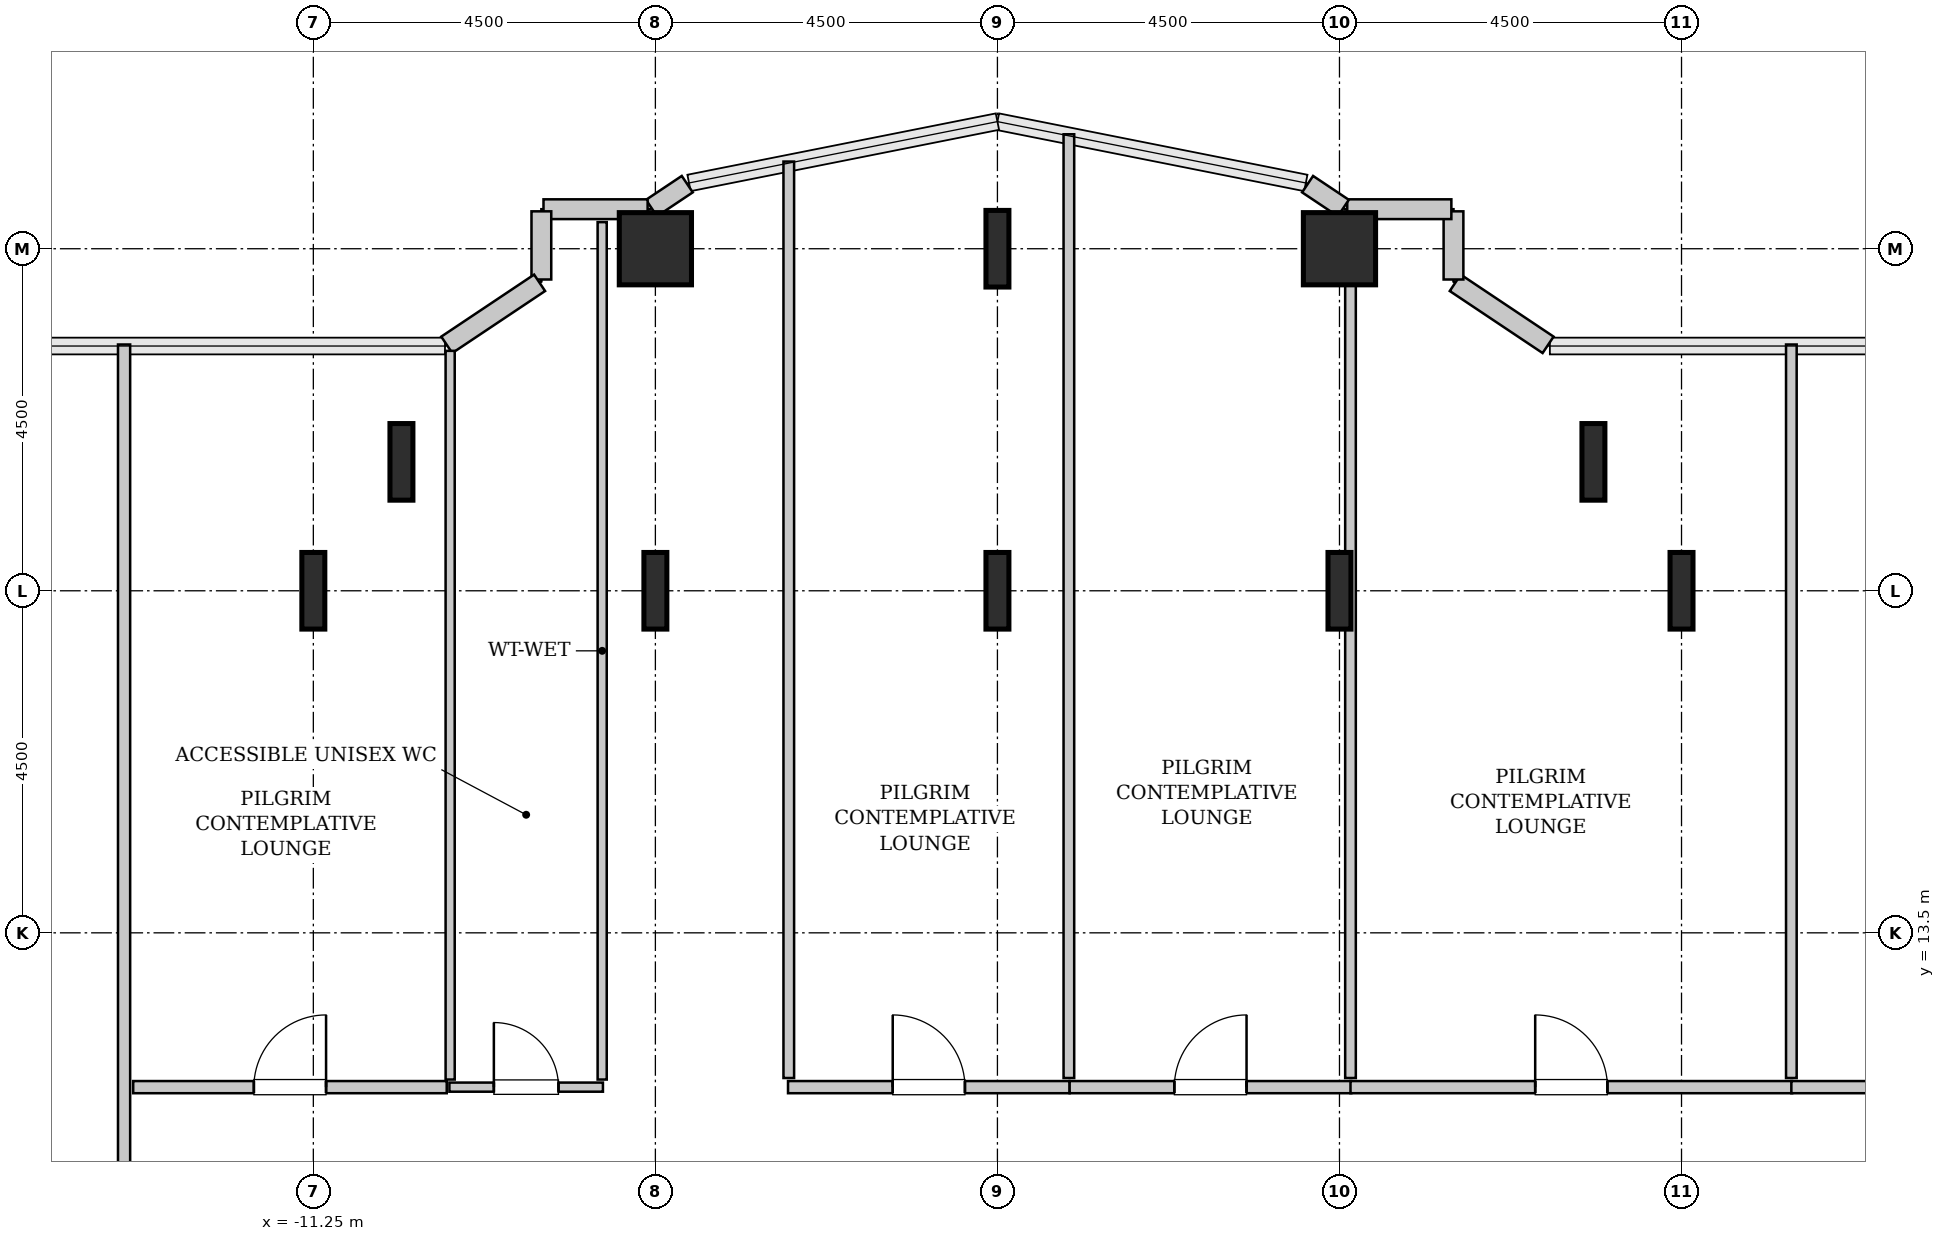
"""IFC4 building model, lengths in metres.
Left out: names, types, materials, properties, quantities, classifications, styles, units other than length and angle.
Written with IfcOpenShell. Run it as: python <this file> out.ifc"""

import sys

from ifc_helpers import new_model, si_unit, direction, frame, frame_2d, origin, origin_2d, place, context, subcontext, project, spatial, rectangle, hollow_rectangle, i_section, extrude, source, transform, mapped, element, fill, save


model = new_model("IFC4")
c1 = context("Model", 3, precision=1e-05, world=origin(), true_north=direction((0.0, 1.0)))
c2 = subcontext(c1, "Body", "Model", "MODEL_VIEW")
j1 = project(units=[si_unit("LENGTHUNIT", "METRE"), si_unit("PLANEANGLEUNIT", "RADIAN")], contexts=[c1])
p1 = place(None, origin())
s1 = spatial("IfcSite", under=j1, at=p1, CompositionType="ELEMENT")
p2 = place(p1, origin())
s2 = spatial("IfcBuilding", under=s1, at=p2, CompositionType="ELEMENT")
p3 = place(p2, frame((0.0, 0.0, 36.8)))
s3 = spatial("IfcBuildingStorey", under=s2, at=p3, CompositionType="ELEMENT", Elevation=36.8)
m1 = source(origin(), c2, "Body", "SweptSolid", [
    extrude(i_section(OverallWidth=0.302, OverallDepth=1.008, WebThickness=0.021, FlangeThickness=0.04, FilletRadius=0.03, at=origin_2d()), origin(), (0.0, 0.0, 1.0), 3.8),
])
for number, where, z_axis, x_axis in (
    (1, (-11.25, 18.0, 0.0), (0.0, 0.0, 1.0), (1.0, 0.0, 0.0)),
    (2, (-10.091, 19.696, 0.0), (0.0, 0.0, 1.0), (1.0, 0.0, 0.0)),
    (3, (-6.75, 18.0, 0.0), (0.0, 0.0, 1.0), (1.0, 0.0, 0.0)),
):
    element("IfcColumn", number, at=place(p3, frame(where, z_axis=z_axis, x_axis=x_axis)), inside=s3, PredefinedType="COLUMN", context=c2, shape_type="MappedRepresentation", body=[
        mapped(m1, transform((0.0, 0.0, 0.0), x_axis=(1.0, 0.0, 0.0), y_axis=(0.0, 1.0, 0.0), z_axis=(0.0, 0.0, 1.0), scale=1.0)),
    ])
m2 = source(origin(), c2, "Body", "SweptSolid", [
    extrude(hollow_rectangle(XDim=0.95, YDim=0.95, WallThickness=0.045, InnerFilletRadius=0.045, OuterFilletRadius=0.09, at=origin_2d()), origin(), (0.0, 0.0, 1.0), 3.8),
])
p4 = place(p3, frame((-6.75, 22.5, 0.0), z_axis=(0.0, 0.0, 1.0), x_axis=(1.0, 0.0, 0.0)))
e4 = element("IfcColumn", 4, at=p4, inside=s3, PredefinedType="COLUMN", context=c2, shape_type="MappedRepresentation", body=[
    mapped(m2, transform((0.0, 0.0, 0.0), x_axis=(1.0, 0.0, 0.0), y_axis=(0.0, 1.0, 0.0), z_axis=(0.0, 0.0, 1.0), scale=1.0)),
])
for number, where, z_axis, x_axis in (
    (5, (-2.25, 18.0, 0.0), (0.0, 0.0, 1.0), (1.0, 0.0, 0.0)),
    (6, (-2.25, 22.5, 0.0), (0.0, 0.0, 1.0), (1.0, 0.0, 0.0)),
    (7, (2.25, 18.0, 0.0), (0.0, 0.0, 1.0), (1.0, 0.0, 0.0)),
):
    element("IfcColumn", number, at=place(p3, frame(where, z_axis=z_axis, x_axis=x_axis)), inside=s3, PredefinedType="COLUMN", context=c2, shape_type="MappedRepresentation", body=[
        mapped(m1, transform((0.0, 0.0, 0.0), x_axis=(1.0, 0.0, 0.0), y_axis=(0.0, 1.0, 0.0), z_axis=(0.0, 0.0, 1.0), scale=1.0)),
    ])
p5 = place(p3, frame((2.25, 22.5, 0.0), z_axis=(0.0, 0.0, 1.0), x_axis=(1.0, 0.0, 0.0)))
e8 = element("IfcColumn", 8, at=p5, inside=s3, PredefinedType="COLUMN", context=c2, shape_type="MappedRepresentation", body=[
    mapped(m2, transform((0.0, 0.0, 0.0), x_axis=(1.0, 0.0, 0.0), y_axis=(0.0, 1.0, 0.0), z_axis=(0.0, 0.0, 1.0), scale=1.0)),
])
for number, where, z_axis, x_axis in (
    (9, (5.591, 19.696, 0.0), (0.0, 0.0, 1.0), (1.0, 0.0, 0.0)),
    (10, (6.75, 18.0, 0.0), (0.0, 0.0, 1.0), (1.0, 0.0, 0.0)),
):
    element("IfcColumn", number, at=place(p3, frame(where, z_axis=z_axis, x_axis=x_axis)), inside=s3, PredefinedType="COLUMN", context=c2, shape_type="MappedRepresentation", body=[
        mapped(m1, transform((0.0, 0.0, 0.0), x_axis=(1.0, 0.0, 0.0), y_axis=(0.0, 1.0, 0.0), z_axis=(0.0, 0.0, 1.0), scale=1.0)),
    ])
m3 = source(origin(), c2, "Body", "SweptSolid", [
    extrude(rectangle(XDim=1.469, YDim=0.26, at=frame_2d((0.734, 0.0))), origin(), (0.0, 0.0, 1.0), 3.55),
])
p6 = place(p3, frame((4.995, 21.236, 0.0), z_axis=(0.0, 0.0, 1.0), x_axis=(-0.831461760506, 0.555581983884, 0.0)))
e11 = element("IfcWall", 11, at=p6, inside=s3, PredefinedType="SOLIDWALL", context=c2, shape_type="MappedRepresentation", body=[
    mapped(m3, transform((0.0, 0.0, 0.0), x_axis=(1.0, 0.0, 0.0), y_axis=(0.0, 1.0, 0.0), z_axis=(0.0, 0.0, 1.0), scale=1.0)),
])
m4 = source(origin(), c2, "Body", "SweptSolid", [
    extrude(rectangle(XDim=0.897, YDim=0.26, at=frame_2d((0.448, 0.0))), origin(), (0.0, 0.0, 1.0), 3.55),
])
p7 = place(p3, frame((3.75, 22.095, 0.0), z_axis=(0.0, 0.0, 1.0), x_axis=(0.0, 1.0, 0.0)))
e12 = element("IfcWall", 12, at=p7, inside=s3, PredefinedType="SOLIDWALL", context=c2, shape_type="MappedRepresentation", body=[
    mapped(m4, transform((0.0, 0.0, 0.0), x_axis=(1.0, 0.0, 0.0), y_axis=(0.0, 1.0, 0.0), z_axis=(0.0, 0.0, 1.0), scale=1.0)),
])
m5 = source(origin(), c2, "Body", "SweptSolid", [
    extrude(rectangle(XDim=1.37, YDim=0.26, at=frame_2d((0.685, 0.0))), origin(), (0.0, 0.0, 1.0), 3.55),
])
p8 = place(p3, frame((3.722, 23.02, 0.0), z_axis=(0.0, 0.0, 1.0), x_axis=(-1.0, 0.0, 0.0)))
e13 = element("IfcWall", 13, at=p8, inside=s3, PredefinedType="SOLIDWALL", context=c2, shape_type="MappedRepresentation", body=[
    mapped(m5, transform((0.0, 0.0, 0.0), x_axis=(1.0, 0.0, 0.0), y_axis=(0.0, 1.0, 0.0), z_axis=(0.0, 0.0, 1.0), scale=1.0)),
])
m6 = source(origin(), c2, "Body", "SweptSolid", [
    extrude(rectangle(XDim=0.565, YDim=0.26, at=frame_2d((0.283, 0.0))), origin(), (0.0, 0.0, 1.0), 3.55),
])
for number, where, z_axis, x_axis in (
    (14, (2.301, 23.036, 0.0), (0.0, 0.0, 1.0), (-0.832, 0.555, 0.0)),
    (15, (-6.331, 23.35, 0.0), (0.0, 0.0, 1.0), (-0.832, -0.555, 0.0)),
):
    element("IfcWall", number, at=place(p3, frame(where, z_axis=z_axis, x_axis=x_axis)), inside=s3, PredefinedType="SOLIDWALL", context=c2, shape_type="MappedRepresentation", body=[
        mapped(m6, transform((0.0, 0.0, 0.0), x_axis=(1.0, 0.0, 0.0), y_axis=(0.0, 1.0, 0.0), z_axis=(0.0, 0.0, 1.0), scale=1.0)),
    ])
p9 = place(p3, frame((-6.852, 23.02, 0.0), z_axis=(0.0, 0.0, 1.0), x_axis=(-1.0, 0.0, 0.0)))
e16 = element("IfcWall", 16, at=p9, inside=s3, PredefinedType="SOLIDWALL", context=c2, shape_type="MappedRepresentation", body=[
    mapped(m5, transform((0.0, 0.0, 0.0), x_axis=(1.0, 0.0, 0.0), y_axis=(0.0, 1.0, 0.0), z_axis=(0.0, 0.0, 1.0), scale=1.0)),
])
p10 = place(p3, frame((-8.25, 22.992, 0.0), z_axis=(0.0, 0.0, 1.0), x_axis=(0.0, -1.0, 0.0)))
e17 = element("IfcWall", 17, at=p10, inside=s3, PredefinedType="SOLIDWALL", context=c2, shape_type="MappedRepresentation", body=[
    mapped(m4, transform((0.0, 0.0, 0.0), x_axis=(1.0, 0.0, 0.0), y_axis=(0.0, 1.0, 0.0), z_axis=(0.0, 0.0, 1.0), scale=1.0)),
])
p11 = place(p3, frame((-8.273, 22.052, 0.0), z_axis=(0.0, 0.0, 1.0), x_axis=(-0.831461760506, -0.555581983884, 0.0)))
e18 = element("IfcWall", 18, at=p11, inside=s3, PredefinedType="SOLIDWALL", context=c2, shape_type="MappedRepresentation", body=[
    mapped(m3, transform((0.0, 0.0, 0.0), x_axis=(1.0, 0.0, 0.0), y_axis=(0.0, 1.0, 0.0), z_axis=(0.0, 0.0, 1.0), scale=1.0)),
])
m7 = source(origin(), c2, "Body", "SweptSolid", [
    extrude(rectangle(XDim=2.02, YDim=0.12, at=frame_2d((1.01, 0.0))), origin(), (0.0, 0.0, 1.0), 3.535),
])
p12 = place(p3, frame((-9.46, 11.47, 0.0), z_axis=(0.0, 0.0, 1.0), x_axis=(1.0, 0.0, 0.0)))
e19 = element("IfcWall", 19, at=p12, inside=s3, PredefinedType="PLUMBINGWALL", context=c2, shape_type="MappedRepresentation", body=[
    mapped(m7, transform((0.0, 0.0, 0.0), x_axis=(1.0, 0.0, 0.0), y_axis=(0.0, 1.0, 0.0), z_axis=(0.0, 0.0, 1.0), scale=1.0)),
])
p13 = place(p12, frame((0.585, 0.0, 0.0)))
e20 = element("IfcOpeningElement", 20, at=p13, cuts=e19, PredefinedType="OPENING", context=c2, shape_type="SweptSolid", body=[
    extrude(rectangle(XDim=0.85, YDim=2.1, at=frame_2d((0.425, 1.05))), frame((0.0, 0.07, 0.0), z_axis=(0.0, -1.0, 0.0), x_axis=(1.0, 0.0, 0.0)), (0.0, 0.0, 1.0), 0.14),
])
m8 = source(origin(), c2, "Body", "SweptSolid", [
    extrude(rectangle(XDim=11.28, YDim=0.12, at=frame_2d((5.64, 0.0))), origin(), (0.0, 0.0, 1.0), 3.535),
])
p14 = place(p3, frame((-7.45, 11.57, 0.0), z_axis=(0.0, 0.0, 1.0), x_axis=(0.0, 1.0, 0.0)))
e21 = element("IfcWall", 21, at=p14, inside=s3, PredefinedType="PLUMBINGWALL", context=c2, shape_type="MappedRepresentation", body=[
    mapped(m8, transform((0.0, 0.0, 0.0), x_axis=(1.0, 0.0, 0.0), y_axis=(0.0, 1.0, 0.0), z_axis=(0.0, 0.0, 1.0), scale=1.0)),
])
m9 = source(origin(), c2, "Body", "SweptSolid", [
    extrude(rectangle(XDim=9.587, YDim=0.12, at=frame_2d((4.793, 0.0))), origin(), (0.0, 0.0, 1.0), 3.535),
])
p15 = place(p3, frame((-9.45, 11.57, 0.0), z_axis=(0.0, 0.0, 1.0), x_axis=(0.0, 1.0, 0.0)))
e22 = element("IfcWall", 22, at=p15, inside=s3, PredefinedType="PLUMBINGWALL", context=c2, shape_type="MappedRepresentation", body=[
    mapped(m9, transform((0.0, 0.0, 0.0), x_axis=(1.0, 0.0, 0.0), y_axis=(0.0, 1.0, 0.0), z_axis=(0.0, 0.0, 1.0), scale=1.0)),
])
m10 = source(origin(), c2, "Body", "SweptSolid", [
    extrude(rectangle(XDim=16.045, YDim=0.16, at=frame_2d((8.022, 0.0))), origin(), (0.0, 0.0, 1.0), 3.535),
])
p16 = place(p3, frame((-13.74, 5.195, 0.0), z_axis=(0.0, 0.0, 1.0), x_axis=(0.0, 1.0, 0.0)))
e23 = element("IfcWall", 23, at=p16, inside=s3, PredefinedType="PARTITIONING", context=c2, shape_type="MappedRepresentation", body=[
    mapped(m10, transform((0.0, 0.0, 0.0), x_axis=(1.0, 0.0, 0.0), y_axis=(0.0, 1.0, 0.0), z_axis=(0.0, 0.0, 1.0), scale=1.0)),
])
p17 = place(p16, frame((2.683, 0.0, 0.0)))
e24 = element("IfcOpeningElement", 24, at=p17, cuts=e23, PredefinedType="OPENING", context=c2, shape_type="SweptSolid", body=[
    extrude(rectangle(XDim=0.95, YDim=2.1, at=frame_2d((0.475, 1.05))), frame((0.0, 0.09, 0.0), z_axis=(0.0, -1.0, 0.0), x_axis=(1.0, 0.0, 0.0)), (0.0, 0.0, 1.0), 0.18),
])
m11 = source(origin(), c2, "Body", "SweptSolid", [
    extrude(rectangle(XDim=4.125, YDim=0.16, at=frame_2d((2.062, 0.0))), origin(), (0.0, 0.0, 1.0), 3.535),
])
p18 = place(p3, frame((-13.62, 11.47, 0.0), z_axis=(0.0, 0.0, 1.0), x_axis=(1.0, 0.0, 0.0)))
e25 = element("IfcWall", 25, at=p18, inside=s3, PredefinedType="PARTITIONING", context=c2, shape_type="MappedRepresentation", body=[
    mapped(m11, transform((0.0, 0.0, 0.0), x_axis=(1.0, 0.0, 0.0), y_axis=(0.0, 1.0, 0.0), z_axis=(0.0, 0.0, 1.0), scale=1.0)),
])
p19 = place(p18, frame((1.587, 0.0, 0.0)))
e26 = element("IfcOpeningElement", 26, at=p19, cuts=e25, PredefinedType="OPENING", context=c2, shape_type="SweptSolid", body=[
    extrude(rectangle(XDim=0.95, YDim=2.1, at=frame_2d((0.475, 1.05))), frame((0.0, 0.09, 0.0), z_axis=(0.0, -1.0, 0.0), x_axis=(1.0, 0.0, 0.0)), (0.0, 0.0, 1.0), 0.18),
])
m12 = source(origin(), c2, "Body", "SweptSolid", [
    extrude(rectangle(XDim=3.705, YDim=0.16, at=frame_2d((1.853, 0.0))), origin(), (0.0, 0.0, 1.0), 3.535),
])
p20 = place(p3, frame((-5.005, 11.47, 0.0), z_axis=(0.0, 0.0, 1.0), x_axis=(1.0, 0.0, 0.0)))
e27 = element("IfcWall", 27, at=p20, inside=s3, PredefinedType="PARTITIONING", context=c2, shape_type="MappedRepresentation", body=[
    mapped(m12, transform((0.0, 0.0, 0.0), x_axis=(1.0, 0.0, 0.0), y_axis=(0.0, 1.0, 0.0), z_axis=(0.0, 0.0, 1.0), scale=1.0)),
])
p21 = place(p20, frame((1.377, 0.0, 0.0)))
e28 = element("IfcOpeningElement", 28, at=p21, cuts=e27, PredefinedType="OPENING", context=c2, shape_type="SweptSolid", body=[
    extrude(rectangle(XDim=0.95, YDim=2.1, at=frame_2d((0.475, 1.05))), frame((0.0, 0.09, 0.0), z_axis=(0.0, -1.0, 0.0), x_axis=(1.0, 0.0, 0.0)), (0.0, 0.0, 1.0), 0.18),
])
m13 = source(origin(), c2, "Body", "SweptSolid", [
    extrude(rectangle(XDim=12.416, YDim=0.14, at=frame_2d((6.208, 0.0))), origin(), (0.0, 0.0, 1.0), 3.535),
])
p22 = place(p3, frame((-1.31, 11.59, 0.0), z_axis=(0.0, 0.0, 1.0), x_axis=(0.0, 1.0, 0.0)))
e29 = element("IfcWall", 29, at=p22, inside=s3, PredefinedType="PARTITIONING", context=c2, shape_type="MappedRepresentation", body=[
    mapped(m13, transform((0.0, 0.0, 0.0), x_axis=(1.0, 0.0, 0.0), y_axis=(0.0, 1.0, 0.0), z_axis=(0.0, 0.0, 1.0), scale=1.0)),
])
m14 = source(origin(), c2, "Body", "SweptSolid", [
    extrude(rectangle(XDim=12.057, YDim=0.14, at=frame_2d((6.028, 0.0))), origin(), (0.0, 0.0, 1.0), 3.535),
])
p23 = place(p3, frame((-4.995, 11.59, 0.0), z_axis=(0.0, 0.0, 1.0), x_axis=(0.0, 1.0, 0.0)))
e30 = element("IfcWall", 30, at=p23, inside=s3, PredefinedType="PARTITIONING", context=c2, shape_type="MappedRepresentation", body=[
    mapped(m14, transform((0.0, 0.0, 0.0), x_axis=(1.0, 0.0, 0.0), y_axis=(0.0, 1.0, 0.0), z_axis=(0.0, 0.0, 1.0), scale=1.0)),
])
m15 = source(origin(), c2, "Body", "SweptSolid", [
    extrude(rectangle(XDim=3.705, YDim=0.16, at=frame_2d((1.853, 0.0))), origin(), (0.0, 0.0, 1.0), 3.535),
])
p24 = place(p3, frame((-1.3, 11.47, 0.0), z_axis=(0.0, 0.0, 1.0), x_axis=(1.0, 0.0, 0.0)))
e31 = element("IfcWall", 31, at=p24, inside=s3, PredefinedType="PARTITIONING", context=c2, shape_type="MappedRepresentation", body=[
    mapped(m15, transform((0.0, 0.0, 0.0), x_axis=(1.0, 0.0, 0.0), y_axis=(0.0, 1.0, 0.0), z_axis=(0.0, 0.0, 1.0), scale=1.0)),
])
p25 = place(p24, frame((1.377, 0.0, 0.0)))
e32 = element("IfcOpeningElement", 32, at=p25, cuts=e31, PredefinedType="OPENING", context=c2, shape_type="SweptSolid", body=[
    extrude(rectangle(XDim=0.95, YDim=2.1, at=frame_2d((0.475, 1.05))), frame((0.0, 0.09, 0.0), z_axis=(0.0, -1.0, 0.0), x_axis=(1.0, 0.0, 0.0)), (0.0, 0.0, 1.0), 0.18),
])
m16 = source(origin(), c2, "Body", "SweptSolid", [
    extrude(rectangle(XDim=11.26, YDim=0.14, at=frame_2d((5.63, 0.0))), origin(), (0.0, 0.0, 1.0), 2.825),
])
p26 = place(p3, frame((2.395, 11.59, 0.0), z_axis=(0.0, 0.0, 1.0), x_axis=(0.0, 1.0, 0.0)))
e33 = element("IfcWall", 33, at=p26, inside=s3, PredefinedType="PARTITIONING", context=c2, shape_type="MappedRepresentation", body=[
    mapped(m16, transform((0.0, 0.0, 0.0), x_axis=(1.0, 0.0, 0.0), y_axis=(0.0, 1.0, 0.0), z_axis=(0.0, 0.0, 1.0), scale=1.0)),
])
m17 = source(origin(), c2, "Body", "SweptSolid", [
    extrude(rectangle(XDim=5.81, YDim=0.16, at=frame_2d((2.905, 0.0))), origin(), (0.0, 0.0, 1.0), 3.535),
])
p27 = place(p3, frame((2.395, 11.47, 0.0), z_axis=(0.0, 0.0, 1.0), x_axis=(1.0, 0.0, 0.0)))
e34 = element("IfcWall", 34, at=p27, inside=s3, PredefinedType="PARTITIONING", context=c2, shape_type="MappedRepresentation", body=[
    mapped(m17, transform((0.0, 0.0, 0.0), x_axis=(1.0, 0.0, 0.0), y_axis=(0.0, 1.0, 0.0), z_axis=(0.0, 0.0, 1.0), scale=1.0)),
])
p28 = place(p27, frame((2.43, 0.0, 0.0)))
e35 = element("IfcOpeningElement", 35, at=p28, cuts=e34, PredefinedType="OPENING", context=c2, shape_type="SweptSolid", body=[
    extrude(rectangle(XDim=0.95, YDim=2.1, at=frame_2d((0.475, 1.05))), frame((0.0, 0.09, 0.0), z_axis=(0.0, -1.0, 0.0), x_axis=(1.0, 0.0, 0.0)), (0.0, 0.0, 1.0), 0.18),
])
m18 = source(origin(), c2, "Body", "SweptSolid", [
    extrude(rectangle(XDim=9.65, YDim=0.14, at=frame_2d((4.825, 0.0))), origin(), (0.0, 0.0, 1.0), 3.535),
])
p29 = place(p3, frame((8.195, 11.59, 0.0), z_axis=(0.0, 0.0, 1.0), x_axis=(0.0, 1.0, 0.0)))
e36 = element("IfcWall", 36, at=p29, inside=s3, PredefinedType="PARTITIONING", context=c2, shape_type="MappedRepresentation", body=[
    mapped(m18, transform((0.0, 0.0, 0.0), x_axis=(1.0, 0.0, 0.0), y_axis=(0.0, 1.0, 0.0), z_axis=(0.0, 0.0, 1.0), scale=1.0)),
])
m19 = source(origin(), c2, "Body", "SweptSolid", [
    extrude(rectangle(XDim=5.425, YDim=0.16, at=frame_2d((2.712, 0.0))), origin(), (0.0, 0.0, 1.0), 3.535),
])
p30 = place(p3, frame((8.195, 11.47, 0.0), z_axis=(0.0, 0.0, 1.0), x_axis=(1.0, 0.0, 0.0)))
e37 = element("IfcWall", 37, at=p30, inside=s3, PredefinedType="PARTITIONING", context=c2, shape_type="MappedRepresentation", body=[
    mapped(m19, transform((0.0, 0.0, 0.0), x_axis=(1.0, 0.0, 0.0), y_axis=(0.0, 1.0, 0.0), z_axis=(0.0, 0.0, 1.0), scale=1.0)),
])
p31 = place(p30, frame((2.238, 0.0, 0.0)))
e38 = element("IfcOpeningElement", 38, at=p31, cuts=e37, PredefinedType="OPENING", context=c2, shape_type="SweptSolid", body=[
    extrude(rectangle(XDim=0.95, YDim=2.1, at=frame_2d((0.475, 1.05))), frame((0.0, 0.09, 0.0), z_axis=(0.0, -1.0, 0.0), x_axis=(1.0, 0.0, 0.0)), (0.0, 0.0, 1.0), 0.18),
])
m20 = source(origin(), c2, "Body", "SweptSolid", [
    extrude(rectangle(XDim=0.85, YDim=2.1, at=frame_2d((0.425, 1.05))), frame((0.0, 0.025, 0.0), z_axis=(0.0, -1.0, 0.0), x_axis=(1.0, 0.0, 0.0)), (0.0, 0.0, 1.0), 0.05),
])
p32 = place(p13, origin())
e39 = element("IfcDoor", 39, at=p32, inside=s3, OperationType="SINGLE_SWING_LEFT", PredefinedType="DOOR", context=c2, shape_type="MappedRepresentation", body=[
    mapped(m20, transform((0.0, 0.0, 0.0), x_axis=(1.0, 0.0, 0.0), y_axis=(0.0, 1.0, 0.0), z_axis=(0.0, 0.0, 1.0), scale=1.0)),
])
fill(e20, e39)
m21 = source(origin(), c2, "Body", "SweptSolid", [
    extrude(rectangle(XDim=0.95, YDim=2.1, at=frame_2d((0.475, 1.05))), frame((0.0, 0.025, 0.0), z_axis=(0.0, -1.0, 0.0), x_axis=(1.0, 0.0, 0.0)), (0.0, 0.0, 1.0), 0.05),
])
p33 = place(p19, origin())
e40 = element("IfcDoor", 40, at=p33, inside=s3, OperationType="SINGLE_SWING_RIGHT", PredefinedType="DOOR", context=c2, shape_type="MappedRepresentation", body=[
    mapped(m21, transform((0.0, 0.0, 0.0), x_axis=(1.0, 0.0, 0.0), y_axis=(0.0, 1.0, 0.0), z_axis=(0.0, 0.0, 1.0), scale=1.0)),
])
fill(e26, e40)
p34 = place(p21, origin())
e41 = element("IfcDoor", 41, at=p34, inside=s3, OperationType="SINGLE_SWING_LEFT", PredefinedType="DOOR", context=c2, shape_type="MappedRepresentation", body=[
    mapped(m21, transform((0.0, 0.0, 0.0), x_axis=(1.0, 0.0, 0.0), y_axis=(0.0, 1.0, 0.0), z_axis=(0.0, 0.0, 1.0), scale=1.0)),
])
fill(e28, e41)
p35 = place(p25, origin())
e42 = element("IfcDoor", 42, at=p35, inside=s3, OperationType="SINGLE_SWING_RIGHT", PredefinedType="DOOR", context=c2, shape_type="MappedRepresentation", body=[
    mapped(m21, transform((0.0, 0.0, 0.0), x_axis=(1.0, 0.0, 0.0), y_axis=(0.0, 1.0, 0.0), z_axis=(0.0, 0.0, 1.0), scale=1.0)),
])
fill(e32, e42)
p36 = place(p28, origin())
e43 = element("IfcDoor", 43, at=p36, inside=s3, OperationType="SINGLE_SWING_LEFT", PredefinedType="DOOR", context=c2, shape_type="MappedRepresentation", body=[
    mapped(m21, transform((0.0, 0.0, 0.0), x_axis=(1.0, 0.0, 0.0), y_axis=(0.0, 1.0, 0.0), z_axis=(0.0, 0.0, 1.0), scale=1.0)),
])
fill(e35, e43)
save(model, sys.argv[1])
